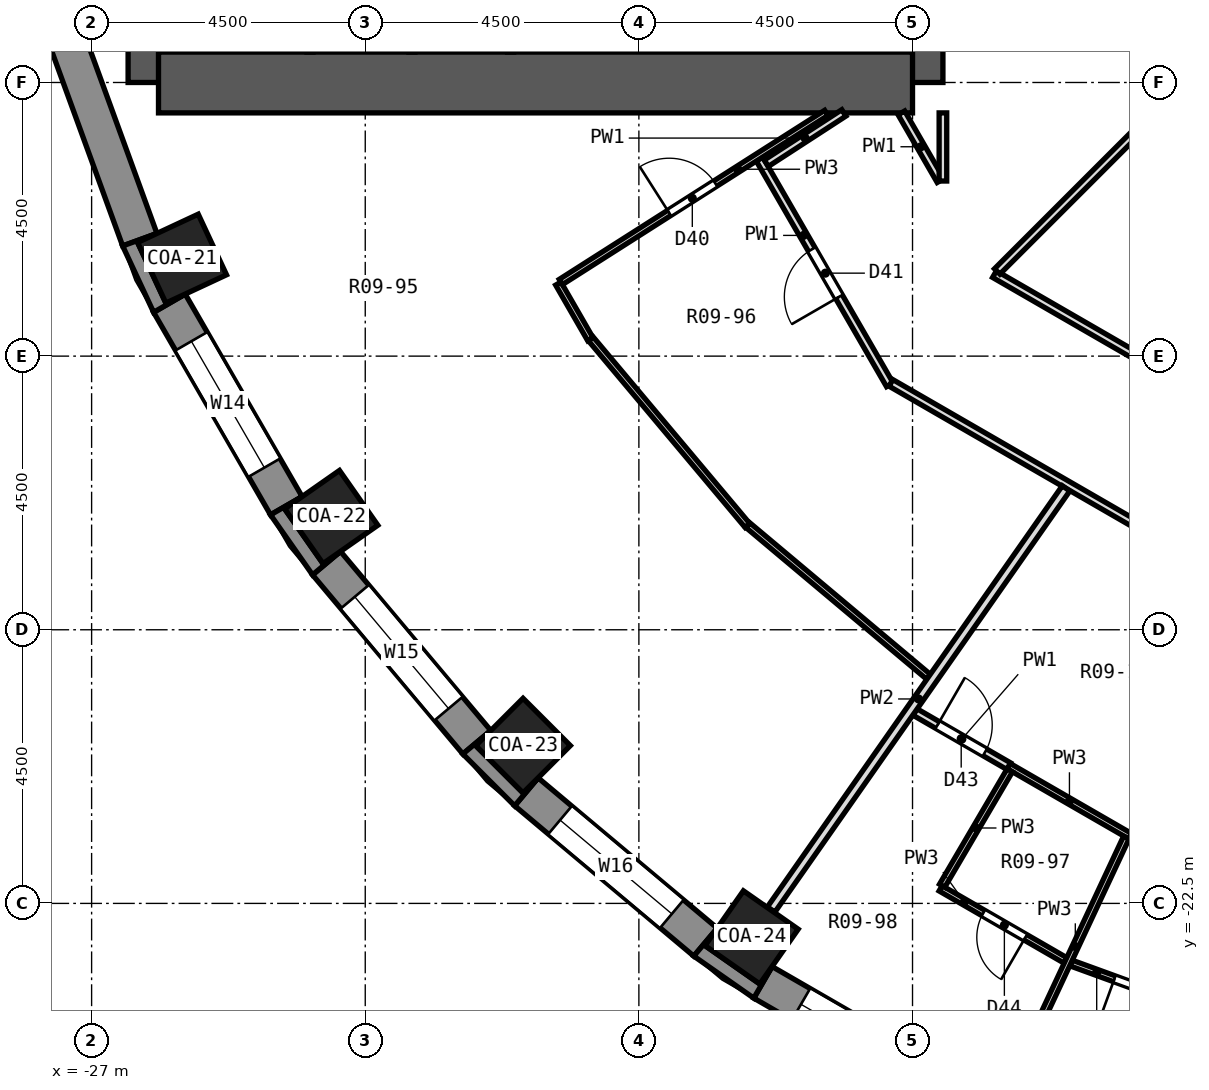
"""IFC4 building model, lengths in metres.
Left out: names, types, materials, properties, quantities, classifications, styles, units other than length and angle.
Written with IfcOpenShell. Run it as: python <this file> out.ifc"""

import sys

from ifc_helpers import new_model, si_unit, direction, frame, frame_2d, origin, origin_2d, place, context, subcontext, project, spatial, polyline, rectangle, outline, extrude, element, fill, save


model = new_model("IFC4")
c1 = context("Model", 3, precision=1e-05, world=origin(), true_north=direction((0.0, 1.0)))
c2 = subcontext(c1, "Body", "Model", "MODEL_VIEW")
j1 = project(units=[si_unit("LENGTHUNIT", "METRE"), si_unit("PLANEANGLEUNIT", "RADIAN")], contexts=[c1])
p1 = place(None, origin())
s1 = spatial("IfcSite", under=j1, at=p1, CompositionType="ELEMENT")
p2 = place(p1, origin())
s2 = spatial("IfcBuilding", under=s1, at=p2, CompositionType="ELEMENT")
p3 = place(p2, frame((0.0, 0.0, 26.3)))
s3 = spatial("IfcBuildingStorey", under=s2, at=p3, CompositionType="ELEMENT", Elevation=26.3)
p4 = place(p3, frame((-25.512, -11.897, 0.0), z_axis=(0.0, 0.0, 1.0), x_axis=(-0.906307787037, -0.422618261741, 0.0)))
e1 = element("IfcColumn", 1, at=p4, inside=s3, PredefinedType="COLUMN", context=c2, shape_type="SweptSolid", body=[
    extrude(rectangle(XDim=1.1, YDim=1.1, at=origin_2d()), origin(), (0.0, 0.0, 1.0), 3.3),
])
p5 = place(p3, frame((-23.059, -16.146, -0.55), z_axis=(0.0, 0.0, 1.0), x_axis=(-0.819152044289, -0.573576436351, 0.0)))
e2 = element("IfcColumn", 2, at=p5, inside=s3, PredefinedType="COLUMN", context=c2, shape_type="SweptSolid", body=[
    extrude(rectangle(XDim=1.1, YDim=1.1, at=origin_2d()), origin(), (0.0, 0.0, 1.0), 3.85),
])
p6 = place(p3, frame((-19.905, -19.905, 0.0), z_axis=(0.0, 0.0, 1.0), x_axis=(-0.707106781187, -0.707106781187, 0.0)))
e3 = element("IfcColumn", 3, at=p6, inside=s3, PredefinedType="COLUMN", context=c2, shape_type="SweptSolid", body=[
    extrude(rectangle(XDim=1.1, YDim=1.1, at=origin_2d()), origin(), (0.0, 0.0, 1.0), 3.3),
])
p7 = place(p3, frame((-16.146, -23.059, -0.55), z_axis=(0.0, 0.0, 1.0), x_axis=(-0.573576436351, -0.819152044289, 0.0)))
e4 = element("IfcColumn", 4, at=p7, inside=s3, PredefinedType="COLUMN", context=c2, shape_type="SweptSolid", body=[
    extrude(rectangle(XDim=1.1, YDim=1.1, at=origin_2d()), origin(), (0.0, 0.0, 1.0), 3.85),
])
p8 = place(p3, frame((-13.5, -9.0, 0.0), z_axis=(0.0, 0.0, 1.0), x_axis=(0.0, 1.0, 0.0)))
e5 = element("IfcWall", 5, at=p8, inside=s3, PredefinedType="SHEAR", context=c2, shape_type="SweptSolid", body=[
    extrude(rectangle(XDim=18.0, YDim=1.0, at=frame_2d((9.0, 0.0))), origin(), (0.0, 0.0, 1.0), 3.3),
])
p9 = place(p8, frame((15.4, 0.0, 0.0)))
e6 = element("IfcOpeningElement", 6, at=p9, cuts=e5, PredefinedType="OPENING", context=c2, shape_type="SweptSolid", body=[
    extrude(rectangle(XDim=1.2, YDim=2.1, at=frame_2d((0.6, 1.05))), frame((0.0, 0.512, 0.0), z_axis=(0.0, -1.0, 0.0), x_axis=(1.0, 0.0, 0.0)), (0.0, 0.0, 1.0), 1.024),
])
p10 = place(p8, frame((1.4, 0.0, 0.0)))
e7 = element("IfcOpeningElement", 7, at=p10, cuts=e5, PredefinedType="OPENING", context=c2, shape_type="SweptSolid", body=[
    extrude(rectangle(XDim=1.2, YDim=2.1, at=frame_2d((0.6, 1.05))), frame((0.0, 0.512, 0.0), z_axis=(0.0, -1.0, 0.0), x_axis=(1.0, 0.0, 0.0)), (0.0, 0.0, 1.0), 1.024),
])
p11 = place(p8, frame((7.5, 0.0, 0.0)))
e8 = element("IfcOpeningElement", 8, at=p11, cuts=e5, PredefinedType="OPENING", context=c2, shape_type="SweptSolid", body=[
    extrude(rectangle(XDim=3.0, YDim=2.4, at=frame_2d((1.5, 1.2))), frame((0.0, 0.512, 0.0), z_axis=(0.0, -1.0, 0.0), x_axis=(1.0, 0.0, 0.0)), (0.0, 0.0, 1.0), 1.024),
])
p12 = place(p3, frame((-25.9, -9.0, 0.0), z_axis=(0.0, 0.0, 1.0), x_axis=(0.0, 1.0, 0.0)))
e9 = element("IfcWall", 9, at=p12, inside=s3, PredefinedType="SHEAR", context=c2, shape_type="SweptSolid", body=[
    extrude(rectangle(XDim=18.0, YDim=1.0, at=frame_2d((9.0, 0.0))), origin(), (0.0, 0.0, 1.0), 3.3),
])
p13 = place(p3, frame((-13.5, -9.0, 0.0), z_axis=(0.0, 0.0, 1.0), x_axis=(-1.0, 0.0, 0.0)))
e10 = element("IfcWall", 10, at=p13, inside=s3, PredefinedType="SHEAR", context=c2, shape_type="SweptSolid", body=[
    extrude(rectangle(XDim=12.4, YDim=1.0, at=frame_2d((6.2, 0.0))), origin(), (0.0, 0.0, 1.0), 3.3),
])
p14 = place(p3, frame((-27.523, -7.971, 0.0), z_axis=(0.0, 0.0, 1.0), x_axis=(0.342028474173, -0.939689588564, 0.0)))
e11 = element("IfcWall", 11, at=p14, inside=s3, PredefinedType="SOLIDWALL", context=c2, shape_type="SweptSolid", body=[
    extrude(rectangle(XDim=3.846, YDim=0.6, at=frame_2d((1.923, 0.0))), origin(), (0.0, 0.0, 1.0), 2.75),
])
p15 = place(p3, frame((-25.721, -12.63, 0.0), z_axis=(0.0, 0.0, 1.0), x_axis=(0.499989888488, -0.86603124159, 0.0)))
e12 = element("IfcWall", 12, at=p15, inside=s3, PredefinedType="SOLIDWALL", context=c2, shape_type="SweptSolid", body=[
    extrude(rectangle(XDim=3.846, YDim=0.6, at=frame_2d((1.923, 0.0))), origin(), (0.0, 0.0, 1.0), 2.75),
])
p16 = place(p15, frame((0.723, 0.0, 0.9)))
e13 = element("IfcOpeningElement", 13, at=p16, cuts=e12, PredefinedType="OPENING", context=c2, shape_type="SweptSolid", body=[
    extrude(rectangle(XDim=2.4, YDim=1.8, at=frame_2d((1.2, 0.9))), frame((0.0, 0.312, 0.0), z_axis=(0.0, -1.0, 0.0), x_axis=(1.0, 0.0, 0.0)), (0.0, 0.0, 1.0), 0.624),
])
p17 = place(p3, frame((-23.137, -16.904, 0.0), z_axis=(0.0, 0.0, 1.0), x_axis=(0.642809392687, -0.766026164483, 0.0)))
e14 = element("IfcWall", 14, at=p17, inside=s3, PredefinedType="SOLIDWALL", context=c2, shape_type="SweptSolid", body=[
    extrude(rectangle(XDim=3.846, YDim=0.6, at=frame_2d((1.923, 0.0))), origin(), (0.0, 0.0, 1.0), 2.75),
])
p18 = place(p17, frame((0.723, 0.0, 0.9)))
e15 = element("IfcOpeningElement", 15, at=p18, cuts=e14, PredefinedType="OPENING", context=c2, shape_type="SweptSolid", body=[
    extrude(rectangle(XDim=2.4, YDim=1.8, at=frame_2d((1.2, 0.9))), frame((0.0, 0.312, 0.0), z_axis=(0.0, -1.0, 0.0), x_axis=(1.0, 0.0, 0.0)), (0.0, 0.0, 1.0), 0.624),
])
p19 = place(p3, frame((-19.85, -20.665, 0.0), z_axis=(0.0, 0.0, 1.0), x_axis=(0.766026164483, -0.642809392687, 0.0)))
e16 = element("IfcWall", 16, at=p19, inside=s3, PredefinedType="SOLIDWALL", context=c2, shape_type="SweptSolid", body=[
    extrude(rectangle(XDim=3.846, YDim=0.6, at=frame_2d((1.923, 0.0))), origin(), (0.0, 0.0, 1.0), 2.75),
])
p20 = place(p19, frame((0.723, 0.0, 0.9)))
e17 = element("IfcOpeningElement", 17, at=p20, cuts=e16, PredefinedType="OPENING", context=c2, shape_type="SweptSolid", body=[
    extrude(rectangle(XDim=2.4, YDim=1.8, at=frame_2d((1.2, 0.9))), frame((0.0, 0.312, 0.0), z_axis=(0.0, -1.0, 0.0), x_axis=(1.0, 0.0, 0.0)), (0.0, 0.0, 1.0), 0.624),
])
p21 = place(p3, frame((-15.96, -23.798, 0.0), z_axis=(0.0, 0.0, 1.0), x_axis=(0.86603124159, -0.499989888488, 0.0)))
e18 = element("IfcWall", 18, at=p21, inside=s3, PredefinedType="SOLIDWALL", context=c2, shape_type="SweptSolid", body=[
    extrude(rectangle(XDim=3.846, YDim=0.6, at=frame_2d((1.923, 0.0))), origin(), (0.0, 0.0, 1.0), 2.75),
])
p22 = place(p21, frame((0.723, 0.0, 0.9)))
e19 = element("IfcOpeningElement", 19, at=p22, cuts=e18, PredefinedType="OPENING", context=c2, shape_type="SweptSolid", body=[
    extrude(rectangle(XDim=2.4, YDim=1.8, at=frame_2d((1.2, 0.9))), frame((0.0, 0.312, 0.0), z_axis=(0.0, -1.0, 0.0), x_axis=(1.0, 0.0, 0.0)), (0.0, 0.0, 1.0), 0.624),
])
p23 = place(p3, origin())
e20 = element("IfcWall", 20, at=p23, inside=s3, PredefinedType="SOLIDWALL", context=c2, shape_type="SweptSolid", body=[
    extrude(outline(polyline([(-25.981, -12.78), (-25.461, -12.479), (-25.779, -12.628), (-26.243, -11.631), (-25.926, -11.483), (-26.49, -11.688), (-25.981, -12.78)])), origin(), (0.0, 0.0, 1.0), 2.75),
])
p24 = place(p3, origin())
e21 = element("IfcWall", 21, at=p24, inside=s3, PredefinedType="SOLIDWALL", context=c2, shape_type="SweptSolid", body=[
    extrude(outline(polyline([(-24.058, -16.11), (-23.367, -17.097), (-22.907, -16.711), (-23.194, -16.912), (-23.825, -16.011), (-23.538, -15.81), (-24.058, -16.11)])), origin(), (0.0, 0.0, 1.0), 2.75),
])
p25 = place(p3, origin())
e22 = element("IfcWall", 22, at=p25, inside=s3, PredefinedType="SOLIDWALL", context=c2, shape_type="SweptSolid", body=[
    extrude(outline(polyline([(-20.043, -20.895), (-19.657, -20.435), (-19.905, -20.683), (-20.683, -19.905), (-20.435, -19.657), (-20.895, -20.043), (-20.043, -20.895)])), origin(), (0.0, 0.0, 1.0), 2.75),
])
p26 = place(p3, origin())
e23 = element("IfcWall", 23, at=p26, inside=s3, PredefinedType="SOLIDWALL", context=c2, shape_type="SweptSolid", body=[
    extrude(outline(polyline([(-17.097, -23.367), (-16.11, -24.058), (-15.81, -23.538), (-16.011, -23.825), (-16.912, -23.194), (-16.711, -22.907), (-17.097, -23.367)])), origin(), (0.0, 0.0, 1.0), 2.75),
])
p27 = place(p3, frame((-19.325, -12.307, 0.0), z_axis=(0.0, 0.0, 1.0), x_axis=(0.499069511817, -0.866561955301, 0.0)))
e24 = element("IfcWall", 24, at=p27, inside=s3, PredefinedType="PARTITIONING", context=c2, shape_type="SweptSolid", body=[
    extrude(rectangle(XDim=1.058, YDim=0.1, at=frame_2d((0.529, 0.0))), origin(), (0.0, 0.0, 1.0), 2.75),
])
p28 = place(p3, frame((-16.017, -10.259, 0.0), z_axis=(0.0, 0.0, 1.0), x_axis=(0.50007738471, -0.865980721091, 0.0)))
e25 = element("IfcWall", 25, at=p28, inside=s3, PredefinedType="PARTITIONING", context=c2, shape_type="SweptSolid", body=[
    extrude(rectangle(XDim=4.287, YDim=0.125, at=frame_2d((2.144, 0.0))), origin(), (0.0, 0.0, 1.0), 2.75),
])
p29 = place(p28, frame((1.717, 0.0, 0.0)))
e26 = element("IfcOpeningElement", 26, at=p29, cuts=e25, PredefinedType="OPENING", context=c2, shape_type="SweptSolid", body=[
    extrude(rectangle(XDim=0.9, YDim=2.1, at=frame_2d((0.45, 1.05))), frame((0.0, 0.074, 0.0), z_axis=(0.0, -1.0, 0.0), x_axis=(1.0, 0.0, 0.0)), (0.0, 0.0, 1.0), 0.149),
])
p30 = place(p3, frame((-13.683, -9.5, 0.0), z_axis=(0.0, 0.0, 1.0), x_axis=(0.500018234033, -0.866014876105, 0.0)))
e27 = element("IfcWall", 27, at=p30, inside=s3, PredefinedType="PARTITIONING", context=c2, shape_type="SweptSolid", body=[
    extrude(rectangle(XDim=1.286, YDim=0.125, at=frame_2d((0.643, 0.0))), origin(), (0.0, 0.0, 1.0), 2.75),
])
p31 = place(p3, frame((-18.79, -13.217, 0.0), z_axis=(0.0, 0.0, 1.0), x_axis=(0.642871887239, -0.765973717955, 0.0)))
e28 = element("IfcWall", 28, at=p31, inside=s3, PredefinedType="PARTITIONING", context=c2, shape_type="SweptSolid", body=[
    extrude(rectangle(XDim=4.006, YDim=0.1, at=frame_2d((2.003, 0.0))), origin(), (0.0, 0.0, 1.0), 2.75),
])
p32 = place(p3, frame((-16.209, -16.279, 0.0), z_axis=(0.0, 0.0, 1.0), x_axis=(0.765983658549, -0.642860042961, 0.0)))
e29 = element("IfcWall", 29, at=p32, inside=s3, PredefinedType="PARTITIONING", context=c2, shape_type="SweptSolid", body=[
    extrude(rectangle(XDim=3.881, YDim=0.1, at=frame_2d((1.94, 0.0))), origin(), (0.0, 0.0, 1.0), 2.75),
])
p33 = place(p3, frame((-13.038, -22.252, 0.0), z_axis=(0.0, 0.0, 1.0), x_axis=(0.865966132161, -0.500102647413, 0.0)))
e30 = element("IfcWall", 30, at=p33, inside=s3, PredefinedType="PARTITIONING", context=c2, shape_type="SweptSolid", body=[
    extrude(rectangle(XDim=2.372, YDim=0.1, at=frame_2d((1.186, 0.0))), origin(), (0.0, 0.0, 1.0), 2.75),
])
p34 = place(p33, frame((0.811, 0.0, 0.0)))
e31 = element("IfcOpeningElement", 31, at=p34, cuts=e30, PredefinedType="OPENING", context=c2, shape_type="SweptSolid", body=[
    extrude(rectangle(XDim=0.8, YDim=2.1, at=frame_2d((0.4, 1.05))), frame((0.0, 0.062, 0.0), z_axis=(0.0, -1.0, 0.0), x_axis=(1.0, 0.0, 0.0)), (0.0, 0.0, 1.0), 0.124),
])
p35 = place(p3, frame((-11.918, -20.243, 0.0), z_axis=(0.0, 0.0, 1.0), x_axis=(0.866176772653, -0.49973772973, 0.0)))
e32 = element("IfcWall", 32, at=p35, inside=s3, PredefinedType="PARTITIONING", context=c2, shape_type="SweptSolid", body=[
    extrude(rectangle(XDim=2.306, YDim=0.1, at=frame_2d((1.153, 0.0))), origin(), (0.0, 0.0, 1.0), 2.75),
])
p36 = place(p3, frame((-13.459, -19.353, 0.0), z_axis=(0.0, 0.0, 1.0), x_axis=(0.865826772399, -0.500343881942, 0.0)))
e33 = element("IfcWall", 33, at=p36, inside=s3, PredefinedType="PARTITIONING", context=c2, shape_type="SweptSolid", body=[
    extrude(rectangle(XDim=1.78, YDim=0.125, at=frame_2d((0.89, 0.0))), origin(), (0.0, 0.0, 1.0), 2.75),
])
p37 = place(p36, frame((0.427, 0.0, 0.0)))
e34 = element("IfcOpeningElement", 34, at=p37, cuts=e33, PredefinedType="OPENING", context=c2, shape_type="SweptSolid", body=[
    extrude(rectangle(XDim=0.9, YDim=2.1, at=frame_2d((0.45, 1.05))), frame((0.0, 0.074, 0.0), z_axis=(0.0, -1.0, 0.0), x_axis=(1.0, 0.0, 0.0)), (0.0, 0.0, 1.0), 0.149),
])
p38 = place(p3, frame((-13.855, -13.94, 0.0), z_axis=(0.0, 0.0, 1.0), x_axis=(0.866024825845, -0.50000100102, 0.0)))
e35 = element("IfcWall", 35, at=p38, inside=s3, PredefinedType="PARTITIONING", context=c2, shape_type="SweptSolid", body=[
    extrude(rectangle(XDim=10.192, YDim=0.125, at=frame_2d((5.096, 0.0))), origin(), (0.0, 0.0, 1.0), 2.75),
])
p39 = place(p3, frame((-12.152, -12.152, 0.0), z_axis=(0.0, 0.0, 1.0), x_axis=(0.866033263559, -0.499986386223, 0.0)))
e36 = element("IfcWall", 36, at=p39, inside=s3, PredefinedType="PARTITIONING", context=c2, shape_type="SweptSolid", body=[
    extrude(rectangle(XDim=8.968, YDim=0.125, at=frame_2d((4.484, 0.0))), origin(), (0.0, 0.0, 1.0), 2.75),
])
p40 = place(p3, frame((-10.894, -23.48, 0.0), z_axis=(0.0, 0.0, 1.0), x_axis=(0.939679129941, -0.342057206844, 0.0)))
e37 = element("IfcWall", 37, at=p40, inside=s3, PredefinedType="PARTITIONING", context=c2, shape_type="SweptSolid", body=[
    extrude(rectangle(XDim=2.371, YDim=0.1, at=frame_2d((1.186, 0.0))), origin(), (0.0, 0.0, 1.0), 2.75),
])
p41 = place(p40, frame((0.76, 0.0, 0.0)))
e38 = element("IfcOpeningElement", 38, at=p41, cuts=e37, PredefinedType="OPENING", context=c2, shape_type="SweptSolid", body=[
    extrude(rectangle(XDim=0.8, YDim=2.1, at=frame_2d((0.4, 1.05))), frame((0.0, 0.062, 0.0), z_axis=(0.0, -1.0, 0.0), x_axis=(1.0, 0.0, 0.0)), (0.0, 0.0, 1.0), 0.124),
])
p42 = place(p3, frame((-19.283, -12.28, 0.0), z_axis=(0.0, 0.0, 1.0), x_axis=(0.843445789111, 0.537214296935, 0.0)))
e39 = element("IfcWall", 39, at=p42, inside=s3, PredefinedType="PARTITIONING", context=c2, shape_type="SweptSolid", body=[
    extrude(rectangle(XDim=5.175, YDim=0.1, at=frame_2d((2.587, 0.0))), origin(), (0.0, 0.0, 1.0), 2.75),
])
p43 = place(p42, frame((2.113, 0.0, 0.0)))
e40 = element("IfcOpeningElement", 40, at=p43, cuts=e39, PredefinedType="OPENING", context=c2, shape_type="SweptSolid", body=[
    extrude(rectangle(XDim=0.9, YDim=2.1, at=frame_2d((0.45, 1.05))), frame((0.0, 0.062, 0.0), z_axis=(0.0, -1.0, 0.0), x_axis=(1.0, 0.0, 0.0)), (0.0, 0.0, 1.0), 0.124),
])
p44 = place(p3, frame((-15.905, -10.328, 0.0), z_axis=(0.0, 0.0, 1.0), x_axis=(0.83882853689, 0.544395706908, 0.0)))
e41 = element("IfcWall", 41, at=p44, inside=s3, PredefinedType="PARTITIONING", context=c2, shape_type="SweptSolid", body=[
    extrude(rectangle(XDim=1.521, YDim=0.125, at=frame_2d((0.76, 0.0))), origin(), (0.0, 0.0, 1.0), 2.75),
])
p45 = place(p3, frame((-12.108, -12.108, 0.0), z_axis=(0.0, 0.0, 1.0), x_axis=(0.707106781187, 0.707106781187, 0.0)))
e42 = element("IfcWall", 42, at=p45, inside=s3, PredefinedType="PARTITIONING", context=c2, shape_type="SweptSolid", body=[
    extrude(rectangle(XDim=7.531, YDim=0.125, at=frame_2d((3.766, 0.0))), origin(), (0.0, 0.0, 1.0), 2.75),
])
p46 = place(p3, frame((-15.825, -22.601, 0.0), z_axis=(0.0, 0.0, 1.0), x_axis=(0.573566991507, 0.819158657559, 0.0)))
e43 = element("IfcWall", 43, at=p46, inside=s3, PredefinedType="PARTITIONING", context=c2, shape_type="SweptSolid", body=[
    extrude(rectangle(XDim=8.455, YDim=0.15, at=frame_2d((4.228, 0.0))), origin(), (0.0, 0.0, 1.0), 2.75),
])
p47 = place(p3, frame((-13.013, -22.209, 0.0), z_axis=(0.0, 0.0, 1.0), x_axis=(0.505622659536, 0.862754731174, 0.0)))
e44 = element("IfcWall", 44, at=p47, inside=s3, PredefinedType="PARTITIONING", context=c2, shape_type="SweptSolid", body=[
    extrude(rectangle(XDim=2.2, YDim=0.1, at=frame_2d((1.1, 0.0))), origin(), (0.0, 0.0, 1.0), 2.75),
])
p48 = place(p3, frame((-11.662, -25.004, 0.0), z_axis=(0.0, 0.0, 1.0), x_axis=(0.423587219874, 0.905855323525, 0.0)))
e45 = element("IfcWall", 45, at=p48, inside=s3, PredefinedType="PARTITIONING", context=c2, shape_type="SweptSolid", body=[
    extrude(rectangle(XDim=3.961, YDim=0.1, at=frame_2d((1.98, 0.0))), origin(), (0.0, 0.0, 1.0), 2.75),
])
p49 = place(p3, frame((-13.0, -10.621, 0.0), z_axis=(0.0, 0.0, 1.0), x_axis=(0.0, 1.0, 0.0)))
e46 = element("IfcWall", 46, at=p49, inside=s3, PredefinedType="PARTITIONING", context=c2, shape_type="SweptSolid", body=[
    extrude(rectangle(XDim=1.121, YDim=0.125, at=frame_2d((0.56, 0.0))), origin(), (0.0, 0.0, 1.0), 2.75),
])
p50 = place(p3, frame((-20.11, -8.5, 0.0), z_axis=(0.0, 0.0, 1.0), x_axis=(0.0, 1.0, 0.0)))
e47 = element("IfcWall", 47, at=p50, inside=s3, PredefinedType="PARTITIONING", context=c2, shape_type="SweptSolid", body=[
    extrude(rectangle(XDim=3.2, YDim=0.1, at=frame_2d((1.6, 0.0))), origin(), (0.0, 0.0, 1.0), 2.75),
])
p51 = place(p3, frame((-21.732, -8.5, 0.0), z_axis=(0.0, 0.0, 1.0), x_axis=(0.0, 1.0, 0.0)))
e48 = element("IfcWall", 48, at=p51, inside=s3, PredefinedType="PARTITIONING", context=c2, shape_type="SweptSolid", body=[
    extrude(rectangle(XDim=3.2, YDim=0.1, at=frame_2d((1.6, 0.0))), origin(), (0.0, 0.0, 1.0), 2.75),
])
p52 = place(p51, frame((1.15, 0.0, 0.0)))
e49 = element("IfcOpeningElement", 49, at=p52, cuts=e48, PredefinedType="OPENING", context=c2, shape_type="SweptSolid", body=[
    extrude(rectangle(XDim=0.9, YDim=2.1, at=frame_2d((0.45, 1.05))), frame((0.0, 0.062, 0.0), z_axis=(0.0, -1.0, 0.0), x_axis=(1.0, 0.0, 0.0)), (0.0, 0.0, 1.0), 0.124),
])
p53 = place(p3, frame((-23.409, -8.5, 0.0), z_axis=(0.0, 0.0, 1.0), x_axis=(0.0, 1.0, 0.0)))
e50 = element("IfcWall", 50, at=p53, inside=s3, PredefinedType="PARTITIONING", context=c2, shape_type="SweptSolid", body=[
    extrude(rectangle(XDim=3.2, YDim=0.1, at=frame_2d((1.6, 0.0))), origin(), (0.0, 0.0, 1.0), 2.75),
])
p54 = place(p53, frame((1.15, 0.0, 0.0)))
e51 = element("IfcOpeningElement", 51, at=p54, cuts=e50, PredefinedType="OPENING", context=c2, shape_type="SweptSolid", body=[
    extrude(rectangle(XDim=0.9, YDim=2.1, at=frame_2d((0.45, 1.05))), frame((0.0, 0.062, 0.0), z_axis=(0.0, -1.0, 0.0), x_axis=(1.0, 0.0, 0.0)), (0.0, 0.0, 1.0), 0.124),
])
p55 = place(p16, origin())
e52 = element("IfcWindow", 52, at=p55, inside=s3, PartitioningType="SINGLE_PANEL", PredefinedType="WINDOW", context=c2, shape_type="SweptSolid", body=[
    extrude(rectangle(XDim=2.4, YDim=1.8, at=frame_2d((1.2, 0.9))), frame((0.0, 0.18, 0.0), z_axis=(0.0, -1.0, 0.0), x_axis=(1.0, 0.0, 0.0)), (0.0, 0.0, 1.0), 0.06),
])
fill(e13, e52)
p56 = place(p18, origin())
e53 = element("IfcWindow", 53, at=p56, inside=s3, PartitioningType="SINGLE_PANEL", PredefinedType="WINDOW", context=c2, shape_type="SweptSolid", body=[
    extrude(rectangle(XDim=2.4, YDim=1.8, at=frame_2d((1.2, 0.9))), frame((0.0, 0.18, 0.0), z_axis=(0.0, -1.0, 0.0), x_axis=(1.0, 0.0, 0.0)), (0.0, 0.0, 1.0), 0.06),
])
fill(e15, e53)
p57 = place(p20, origin())
e54 = element("IfcWindow", 54, at=p57, inside=s3, PartitioningType="SINGLE_PANEL", PredefinedType="WINDOW", context=c2, shape_type="SweptSolid", body=[
    extrude(rectangle(XDim=2.4, YDim=1.8, at=frame_2d((1.2, 0.9))), frame((0.0, 0.18, 0.0), z_axis=(0.0, -1.0, 0.0), x_axis=(1.0, 0.0, 0.0)), (0.0, 0.0, 1.0), 0.06),
])
fill(e17, e54)
p58 = place(p22, origin())
e55 = element("IfcWindow", 55, at=p58, inside=s3, PartitioningType="SINGLE_PANEL", PredefinedType="WINDOW", context=c2, shape_type="SweptSolid", body=[
    extrude(rectangle(XDim=2.4, YDim=1.8, at=frame_2d((1.2, 0.9))), frame((0.0, 0.18, 0.0), z_axis=(0.0, -1.0, 0.0), x_axis=(1.0, 0.0, 0.0)), (0.0, 0.0, 1.0), 0.06),
])
fill(e19, e55)
p59 = place(p43, origin())
e56 = element("IfcDoor", 56, at=p59, inside=s3, OperationType="SINGLE_SWING_LEFT", PredefinedType="DOOR", context=c2, shape_type="SweptSolid", body=[
    extrude(rectangle(XDim=0.9, YDim=2.1, at=frame_2d((0.45, 1.05))), frame((0.0, 0.025, 0.0), z_axis=(0.0, -1.0, 0.0), x_axis=(1.0, 0.0, 0.0)), (0.0, 0.0, 1.0), 0.05),
])
fill(e40, e56)
p60 = place(p29, frame((0.9, 0.0, 0.0), z_axis=(0.0, 0.0, 1.0), x_axis=(-1.0, 0.0, 0.0)))
e57 = element("IfcDoor", 57, at=p60, inside=s3, OperationType="SINGLE_SWING_LEFT", PredefinedType="DOOR", context=c2, shape_type="SweptSolid", body=[
    extrude(rectangle(XDim=0.9, YDim=2.1, at=frame_2d((0.45, 1.05))), frame((0.0, 0.025, 0.0), z_axis=(0.0, -1.0, 0.0), x_axis=(1.0, 0.0, 0.0)), (0.0, 0.0, 1.0), 0.05),
])
fill(e26, e57)
p61 = place(p37, origin())
e58 = element("IfcDoor", 58, at=p61, inside=s3, OperationType="SINGLE_SWING_LEFT", PredefinedType="DOOR", context=c2, shape_type="SweptSolid", body=[
    extrude(rectangle(XDim=0.9, YDim=2.1, at=frame_2d((0.45, 1.05))), frame((0.0, 0.025, 0.0), z_axis=(0.0, -1.0, 0.0), x_axis=(1.0, 0.0, 0.0)), (0.0, 0.0, 1.0), 0.05),
])
fill(e34, e58)
p62 = place(p34, frame((0.8, 0.0, 0.0), z_axis=(0.0, 0.0, 1.0), x_axis=(-1.0, 0.0, 0.0)))
e59 = element("IfcDoor", 59, at=p62, inside=s3, OperationType="SINGLE_SWING_LEFT", PredefinedType="DOOR", context=c2, shape_type="SweptSolid", body=[
    extrude(rectangle(XDim=0.8, YDim=2.1, at=frame_2d((0.4, 1.05))), frame((0.0, 0.025, 0.0), z_axis=(0.0, -1.0, 0.0), x_axis=(1.0, 0.0, 0.0)), (0.0, 0.0, 1.0), 0.05),
])
fill(e31, e59)
p63 = place(p41, frame((0.8, 0.0, 0.0), z_axis=(0.0, 0.0, 1.0), x_axis=(-1.0, 0.0, 0.0)))
e60 = element("IfcDoor", 60, at=p63, inside=s3, OperationType="SINGLE_SWING_RIGHT", PredefinedType="DOOR", context=c2, shape_type="SweptSolid", body=[
    extrude(rectangle(XDim=0.8, YDim=2.1, at=frame_2d((0.4, 1.05))), frame((0.0, 0.025, 0.0), z_axis=(0.0, -1.0, 0.0), x_axis=(1.0, 0.0, 0.0)), (0.0, 0.0, 1.0), 0.05),
])
fill(e38, e60)
save(model, sys.argv[1])
